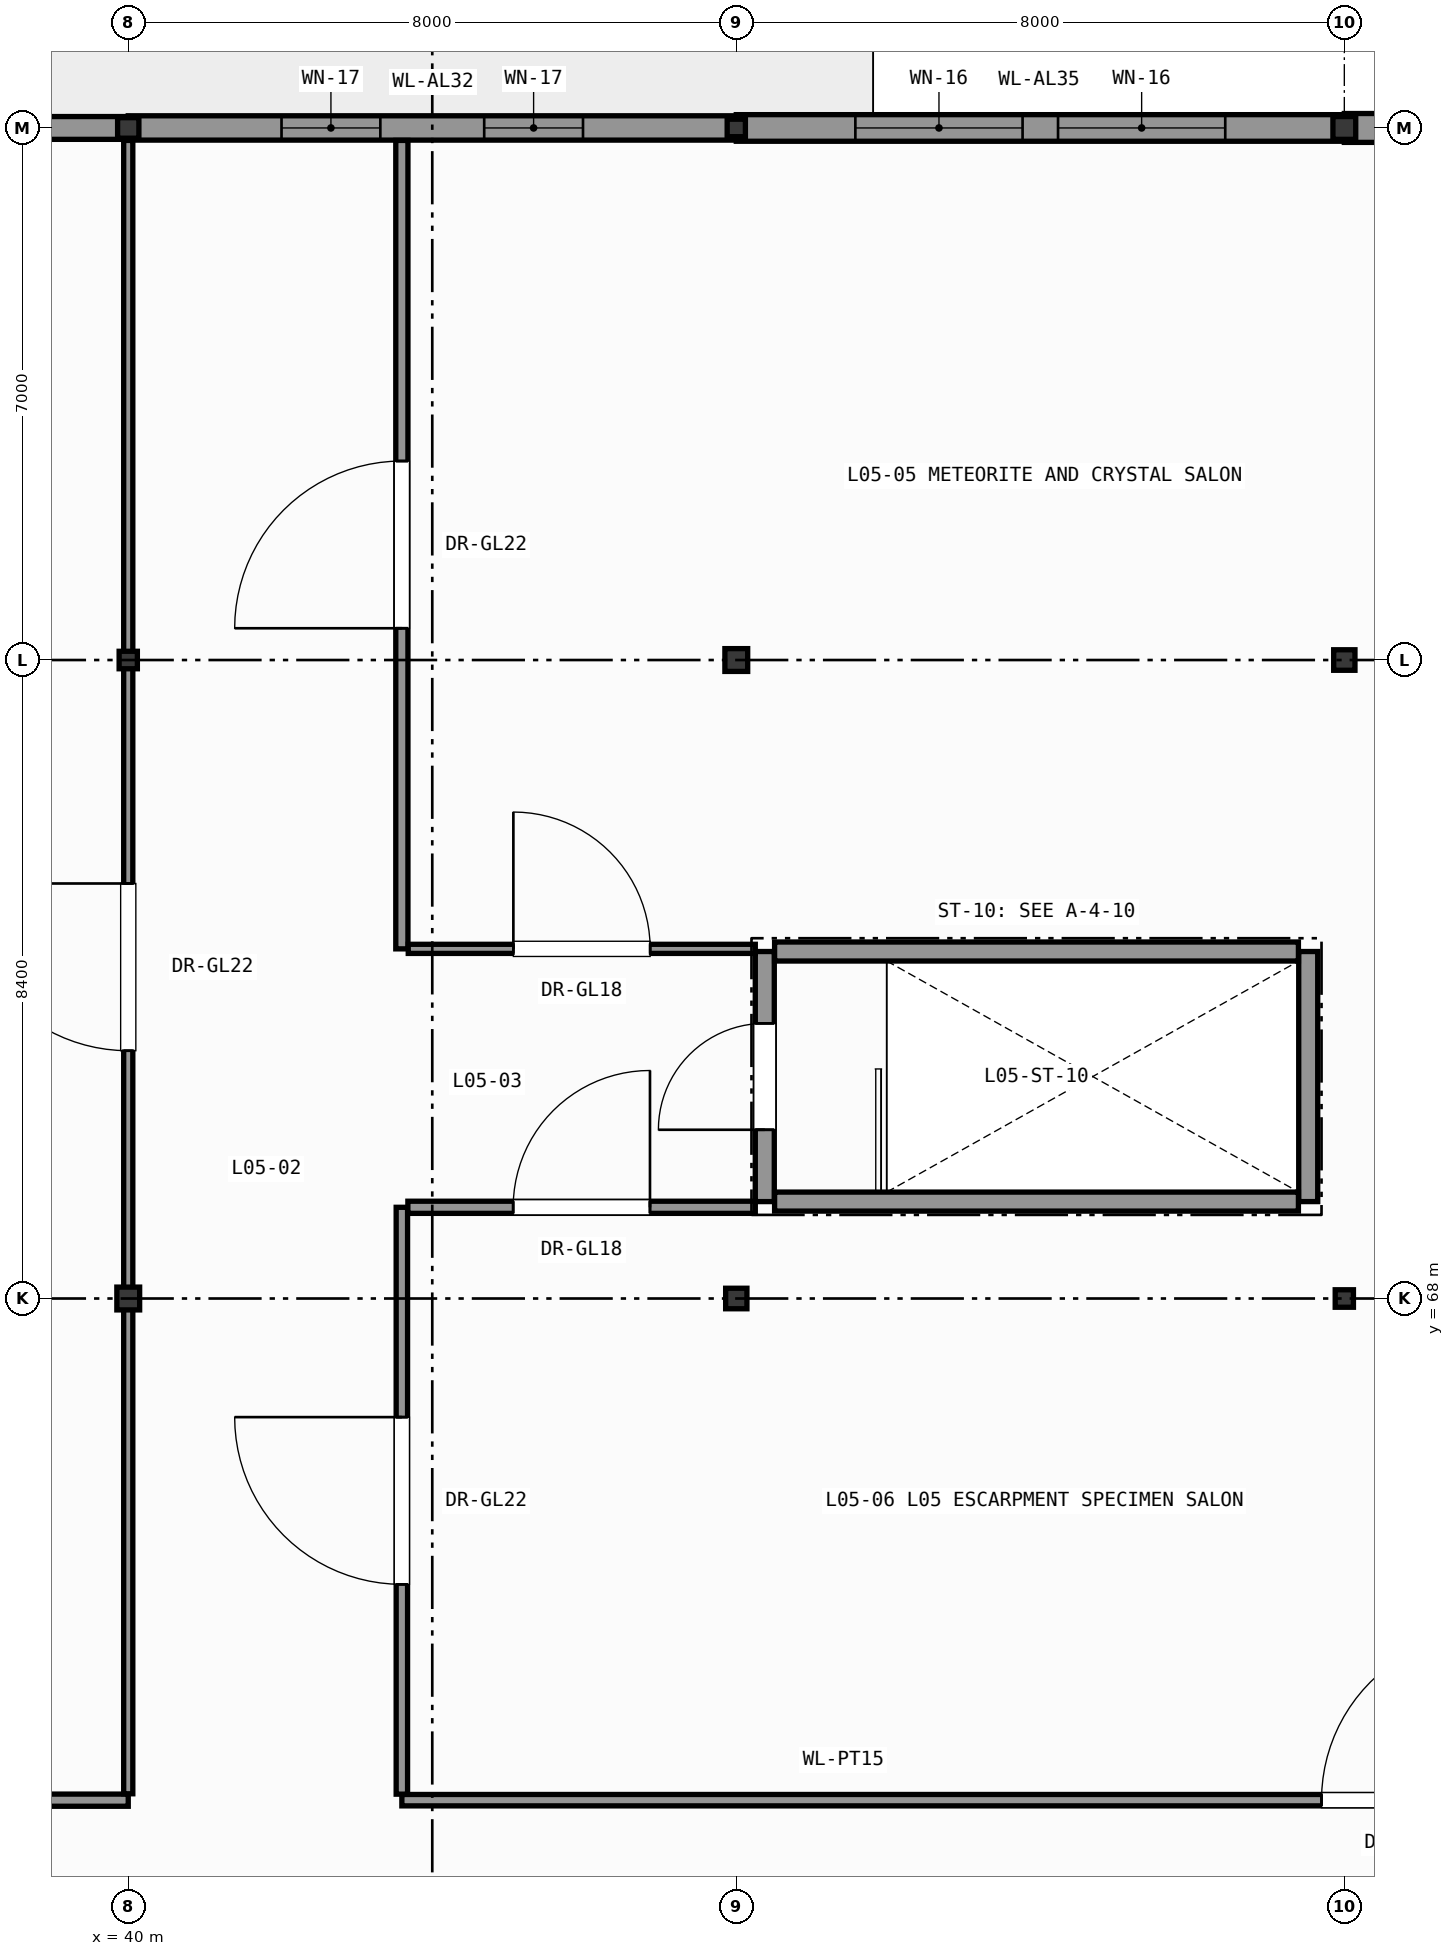
"""IFC4 building model, lengths in metres.
Left out: names, types, materials, properties, quantities, classifications, styles, units other than length and angle.
Written with IfcOpenShell. Run it as: python <this file> out.ifc"""

import sys

from ifc_helpers import new_model, si_unit, direction, frame, frame_2d, origin, origin_2d, place, context, subcontext, project, spatial, rectangle, i_section, extrude, element, fill, save


model = new_model("IFC4")
c1 = context("Model", 3, precision=1e-05, world=origin(), true_north=direction((0.0, 1.0)))
c2 = subcontext(c1, "Body", "Model", "MODEL_VIEW")
j1 = project(units=[si_unit("LENGTHUNIT", "METRE"), si_unit("PLANEANGLEUNIT", "RADIAN")], contexts=[c1])
p1 = place(None, origin())
s1 = spatial("IfcSite", under=j1, at=p1, CompositionType="ELEMENT")
p2 = place(p1, origin())
s2 = spatial("IfcBuilding", under=s1, at=p2, CompositionType="ELEMENT")
p3 = place(p2, frame((0.0, 0.0, 22.2)))
s3 = spatial("IfcBuildingStorey", under=s2, at=p3, CompositionType="ELEMENT", Elevation=22.2)
p4 = place(p3, frame((40.0, 68.0, 0.0), z_axis=(0.0, 0.0, 1.0), x_axis=(1.0, 0.0, 0.0)))
e1 = element("IfcColumn", 1, at=p4, inside=s3, PredefinedType="COLUMN", context=c2, shape_type="SweptSolid", body=[
    extrude(i_section(OverallWidth=0.3, OverallDepth=0.3, WebThickness=0.011, FlangeThickness=0.019, FilletRadius=0.027, at=origin_2d()), origin(), (0.0, 0.0, 1.0), 4.2),
])
p5 = place(p3, frame((40.0, 76.4, 0.0), z_axis=(0.0, 0.0, 1.0), x_axis=(1.0, 0.0, 0.0)))
e2 = element("IfcColumn", 2, at=p5, inside=s3, PredefinedType="COLUMN", context=c2, shape_type="SweptSolid", body=[
    extrude(i_section(OverallWidth=0.24, OverallDepth=0.23, WebThickness=0.008, FlangeThickness=0.012, FilletRadius=0.021, at=origin_2d()), origin(), (0.0, 0.0, 1.0), 4.2),
])
for number, where, z_axis, x_axis in (
    (3, (40.0, 83.4, 0.0), (0.0, 0.0, 1.0), (1.0, 0.0, 0.0)),
    (4, (48.0, 68.0, 0.0), (0.0, 0.0, 1.0), (1.0, 0.0, 0.0)),
):
    element("IfcColumn", number, at=place(p3, frame(where, z_axis=z_axis, x_axis=x_axis)), inside=s3, PredefinedType="COLUMN", context=c2, shape_type="SweptSolid", body=[
        extrude(i_section(OverallWidth=0.28, OverallDepth=0.27, WebThickness=0.008, FlangeThickness=0.013, FilletRadius=0.024, at=origin_2d()), origin(), (0.0, 0.0, 1.0), 4.2),
    ])
p6 = place(p3, frame((48.0, 76.4, 0.0), z_axis=(0.0, 0.0, 1.0), x_axis=(1.0, 0.0, 0.0)))
e5 = element("IfcColumn", 5, at=p6, inside=s3, PredefinedType="COLUMN", context=c2, shape_type="SweptSolid", body=[
    extrude(i_section(OverallWidth=0.3, OverallDepth=0.3, WebThickness=0.011, FlangeThickness=0.019, FilletRadius=0.027, at=origin_2d()), origin(), (0.0, 0.0, 1.0), 4.2),
])
for number, where, z_axis, x_axis in (
    (6, (48.0, 83.4, 0.0), (0.0, 0.0, 1.0), (1.0, 0.0, 0.0)),
    (7, (56.0, 68.0, 0.0), (0.0, 0.0, 1.0), (1.0, 0.0, 0.0)),
):
    element("IfcColumn", number, at=place(p3, frame(where, z_axis=z_axis, x_axis=x_axis)), inside=s3, PredefinedType="COLUMN", context=c2, shape_type="SweptSolid", body=[
        extrude(i_section(OverallWidth=0.24, OverallDepth=0.23, WebThickness=0.008, FlangeThickness=0.012, FilletRadius=0.021, at=origin_2d()), origin(), (0.0, 0.0, 1.0), 4.2),
    ])
p7 = place(p3, frame((56.0, 76.4, 0.0), z_axis=(0.0, 0.0, 1.0), x_axis=(1.0, 0.0, 0.0)))
e8 = element("IfcColumn", 8, at=p7, inside=s3, PredefinedType="COLUMN", context=c2, shape_type="SweptSolid", body=[
    extrude(i_section(OverallWidth=0.28, OverallDepth=0.27, WebThickness=0.008, FlangeThickness=0.013, FilletRadius=0.024, at=origin_2d()), origin(), (0.0, 0.0, 1.0), 4.2),
])
p8 = place(p3, frame((56.0, 83.4, 0.0), z_axis=(0.0, 0.0, 1.0), x_axis=(1.0, 0.0, 0.0)))
e9 = element("IfcColumn", 9, at=p8, inside=s3, PredefinedType="COLUMN", context=c2, shape_type="SweptSolid", body=[
    extrude(i_section(OverallWidth=0.3, OverallDepth=0.3, WebThickness=0.011, FlangeThickness=0.019, FilletRadius=0.027, at=origin_2d()), origin(), (0.0, 0.0, 1.0), 4.2),
])
p9 = place(p3, frame((56.0, 83.4, 0.0), z_axis=(0.0, 0.0, 1.0), x_axis=(1.0, 0.0, 0.0)))
e10 = element("IfcWall", 10, at=p9, inside=s3, PredefinedType="SOLIDWALL", context=c2, shape_type="SweptSolid", body=[
    extrude(rectangle(XDim=13.821, YDim=0.38, at=frame_2d((6.911, 0.0))), origin(), (0.0, 0.0, 1.0), 3.98),
])
p10 = place(p9, frame((3.807, 0.0, 0.95)))
e11 = element("IfcOpeningElement", 11, at=p10, cuts=e10, PredefinedType="OPENING", context=c2, shape_type="SweptSolid", body=[
    extrude(rectangle(XDim=1.6, YDim=2.6, at=frame_2d((0.8, 1.3))), frame((0.0, 0.2, 0.0), z_axis=(0.0, -1.0, 0.0), x_axis=(1.0, 0.0, 0.0)), (0.0, 0.0, 1.0), 0.4),
])
p11 = place(p9, frame((8.414, 0.0, 0.95)))
e12 = element("IfcOpeningElement", 12, at=p11, cuts=e10, PredefinedType="OPENING", context=c2, shape_type="SweptSolid", body=[
    extrude(rectangle(XDim=1.6, YDim=2.6, at=frame_2d((0.8, 1.3))), frame((0.0, 0.2, 0.0), z_axis=(0.0, -1.0, 0.0), x_axis=(1.0, 0.0, 0.0)), (0.0, 0.0, 1.0), 0.4),
])
p12 = place(p3, frame((48.0, 83.4, 0.0), z_axis=(0.0, 0.0, 1.0), x_axis=(1.0, 0.0, 0.0)))
e13 = element("IfcWall", 13, at=p12, inside=s3, PredefinedType="SOLIDWALL", context=c2, shape_type="SweptSolid", body=[
    extrude(rectangle(XDim=8.0, YDim=0.35, at=frame_2d((4.0, 0.0))), origin(), (0.0, 0.0, 1.0), 3.665),
])
p13 = place(p12, frame((1.567, 0.0, 0.95)))
e14 = element("IfcOpeningElement", 14, at=p13, cuts=e13, PredefinedType="OPENING", context=c2, shape_type="SweptSolid", body=[
    extrude(rectangle(XDim=2.2, YDim=2.31, at=frame_2d((1.1, 1.155))), frame((0.0, 0.185, 0.0), z_axis=(0.0, -1.0, 0.0), x_axis=(1.0, 0.0, 0.0)), (0.0, 0.0, 1.0), 0.37),
])
p14 = place(p12, frame((4.233, 0.0, 0.95)))
e15 = element("IfcOpeningElement", 15, at=p14, cuts=e13, PredefinedType="OPENING", context=c2, shape_type="SweptSolid", body=[
    extrude(rectangle(XDim=2.2, YDim=2.31, at=frame_2d((1.1, 1.155))), frame((0.0, 0.185, 0.0), z_axis=(0.0, -1.0, 0.0), x_axis=(1.0, 0.0, 0.0)), (0.0, 0.0, 1.0), 0.37),
])
p15 = place(p3, frame((40.0, 83.4, 0.0), z_axis=(0.0, 0.0, 1.0), x_axis=(1.0, 0.0, 0.0)))
e16 = element("IfcWall", 16, at=p15, inside=s3, PredefinedType="SOLIDWALL", context=c2, shape_type="SweptSolid", body=[
    extrude(rectangle(XDim=8.0, YDim=0.32, at=frame_2d((4.0, 0.0))), origin(), (0.0, 0.0, 1.0), 3.705),
])
p16 = place(p15, frame((2.017, 0.0, 0.95)))
e17 = element("IfcOpeningElement", 17, at=p16, cuts=e16, PredefinedType="OPENING", context=c2, shape_type="SweptSolid", body=[
    extrude(rectangle(XDim=1.3, YDim=2.3, at=frame_2d((0.65, 1.15))), frame((0.0, 0.17, 0.0), z_axis=(0.0, -1.0, 0.0), x_axis=(1.0, 0.0, 0.0)), (0.0, 0.0, 1.0), 0.34),
])
p17 = place(p15, frame((4.683, 0.0, 0.95)))
e18 = element("IfcOpeningElement", 18, at=p17, cuts=e16, PredefinedType="OPENING", context=c2, shape_type="SweptSolid", body=[
    extrude(rectangle(XDim=1.3, YDim=2.3, at=frame_2d((0.65, 1.15))), frame((0.0, 0.17, 0.0), z_axis=(0.0, -1.0, 0.0), x_axis=(1.0, 0.0, 0.0)), (0.0, 0.0, 1.0), 0.34),
])
p18 = place(p3, frame((32.0, 83.4, 0.0), z_axis=(0.0, 0.0, 1.0), x_axis=(1.0, 0.0, 0.0)))
e19 = element("IfcWall", 19, at=p18, inside=s3, PredefinedType="SOLIDWALL", context=c2, shape_type="SweptSolid", body=[
    extrude(rectangle(XDim=8.0, YDim=0.3, at=frame_2d((4.0, 0.0))), origin(), (0.0, 0.0, 1.0), 3.485),
])
p19 = place(p18, frame((1.817, 0.0, 0.95)))
e20 = element("IfcOpeningElement", 20, at=p19, cuts=e19, PredefinedType="OPENING", context=c2, shape_type="SweptSolid", body=[
    extrude(rectangle(XDim=1.7, YDim=2.13, at=frame_2d((0.85, 1.065))), frame((0.0, 0.16, 0.0), z_axis=(0.0, -1.0, 0.0), x_axis=(1.0, 0.0, 0.0)), (0.0, 0.0, 1.0), 0.32),
])
p20 = place(p18, frame((4.483, 0.0, 0.95)))
e21 = element("IfcOpeningElement", 21, at=p20, cuts=e19, PredefinedType="OPENING", context=c2, shape_type="SweptSolid", body=[
    extrude(rectangle(XDim=1.7, YDim=2.13, at=frame_2d((0.85, 1.065))), frame((0.0, 0.16, 0.0), z_axis=(0.0, -1.0, 0.0), x_axis=(1.0, 0.0, 0.0)), (0.0, 0.0, 1.0), 0.32),
])
p21 = place(p3, frame((48.375, 69.275, 0.0), z_axis=(0.0, 0.0, 1.0), x_axis=(0.0, 1.0, 0.0)))
e22 = element("IfcWall", 22, at=p21, inside=s3, PredefinedType="SHEAR", context=c2, shape_type="SweptSolid", body=[
    extrude(rectangle(XDim=3.29, YDim=0.25, at=frame_2d((1.645, 0.0))), origin(), (0.0, 0.0, 1.0), 3.98),
])
p22 = place(p21, frame((0.945, 0.0, 0.0)))
e23 = element("IfcOpeningElement", 23, at=p22, cuts=e22, PredefinedType="OPENING", context=c2, shape_type="SweptSolid", body=[
    extrude(rectangle(XDim=1.4, YDim=2.2, at=frame_2d((0.7, 1.1))), frame((0.0, 0.135, 0.0), z_axis=(0.0, -1.0, 0.0), x_axis=(1.0, 0.0, 0.0)), (0.0, 0.0, 1.0), 0.27),
])
p23 = place(p3, frame((55.525, 69.275, 0.0), z_axis=(0.0, 0.0, 1.0), x_axis=(0.0, 1.0, 0.0)))
e24 = element("IfcWall", 24, at=p23, inside=s3, PredefinedType="SHEAR", context=c2, shape_type="SweptSolid", body=[
    extrude(rectangle(XDim=3.29, YDim=0.25, at=frame_2d((1.645, 0.0))), origin(), (0.0, 0.0, 1.0), 3.98),
])
for number, where, z_axis, x_axis in (
    (25, (48.504, 69.275, 0.0), (0.0, 0.0, 1.0), (1.0, 0.0, 0.0)),
    (26, (48.504, 72.565, 0.0), (0.0, 0.0, 1.0), (1.0, 0.0, 0.0)),
):
    element("IfcWall", number, at=place(p3, frame(where, z_axis=z_axis, x_axis=x_axis)), inside=s3, PredefinedType="SHEAR", context=c2, shape_type="SweptSolid", body=[
        extrude(rectangle(XDim=6.892, YDim=0.25, at=frame_2d((3.446, 0.0))), origin(), (0.0, 0.0, 1.0), 3.98),
    ])
p24 = place(p3, frame((19.394, 61.4, 0.0), z_axis=(0.0, 0.0, 1.0), x_axis=(1.0, 0.0, 0.0)))
e27 = element("IfcWall", 27, at=p24, inside=s3, PredefinedType="PARTITIONING", context=c2, shape_type="SweptSolid", body=[
    extrude(rectangle(XDim=20.606, YDim=0.16, at=frame_2d((10.303, 0.0))), origin(), (0.0, 0.0, 1.0), 3.98),
])
p25 = place(p24, frame((9.203, 0.0, 0.0)))
e28 = element("IfcOpeningElement", 28, at=p25, cuts=e27, PredefinedType="OPENING", context=c2, shape_type="SweptSolid", body=[
    extrude(rectangle(XDim=2.2, YDim=2.6, at=frame_2d((1.1, 1.3))), frame((0.0, 0.09, 0.0), z_axis=(0.0, -1.0, 0.0), x_axis=(1.0, 0.0, 0.0)), (0.0, 0.0, 1.0), 0.18),
])
p26 = place(p3, frame((43.6, 61.4, 0.0), z_axis=(0.0, 0.0, 1.0), x_axis=(1.0, 0.0, 0.0)))
e29 = element("IfcWall", 29, at=p26, inside=s3, PredefinedType="PARTITIONING", context=c2, shape_type="SweptSolid", body=[
    extrude(rectangle(XDim=26.4, YDim=0.15, at=frame_2d((13.2, 0.0))), origin(), (0.0, 0.0, 1.0), 3.98),
])
p27 = place(p26, frame((12.1, 0.0, 0.0)))
e30 = element("IfcOpeningElement", 30, at=p27, cuts=e29, PredefinedType="OPENING", context=c2, shape_type="SweptSolid", body=[
    extrude(rectangle(XDim=2.2, YDim=2.6, at=frame_2d((1.1, 1.3))), frame((0.0, 0.085, 0.0), z_axis=(0.0, -1.0, 0.0), x_axis=(1.0, 0.0, 0.0)), (0.0, 0.0, 1.0), 0.17),
])
p28 = place(p3, frame((40.0, 61.484, 0.0), z_axis=(0.0, 0.0, 1.0), x_axis=(0.0, 1.0, 0.0)))
e31 = element("IfcWall", 31, at=p28, inside=s3, PredefinedType="PARTITIONING", context=c2, shape_type="SweptSolid", body=[
    extrude(rectangle(XDim=21.752, YDim=0.12, at=frame_2d((10.876, 0.0))), origin(), (0.0, 0.0, 1.0), 3.485),
])
p29 = place(p28, frame((9.776, 0.0, 0.0)))
e32 = element("IfcOpeningElement", 32, at=p29, cuts=e31, PredefinedType="OPENING", context=c2, shape_type="SweptSolid", body=[
    extrude(rectangle(XDim=2.2, YDim=2.6, at=frame_2d((1.1, 1.3))), frame((0.0, 0.07, 0.0), z_axis=(0.0, -1.0, 0.0), x_axis=(1.0, 0.0, 0.0)), (0.0, 0.0, 1.0), 0.14),
])
p30 = place(p3, frame((43.6, 72.6, 0.0), z_axis=(0.0, 0.0, 1.0), x_axis=(0.0, 1.0, 0.0)))
e33 = element("IfcWall", 33, at=p30, inside=s3, PredefinedType="PARTITIONING", context=c2, shape_type="SweptSolid", body=[
    extrude(rectangle(XDim=10.636, YDim=0.16, at=frame_2d((5.318, 0.0))), origin(), (0.0, 0.0, 1.0), 3.98),
])
p31 = place(p30, frame((4.218, 0.0, 0.0)))
e34 = element("IfcOpeningElement", 34, at=p31, cuts=e33, PredefinedType="OPENING", context=c2, shape_type="SweptSolid", body=[
    extrude(rectangle(XDim=2.2, YDim=2.6, at=frame_2d((1.1, 1.3))), frame((0.0, 0.09, 0.0), z_axis=(0.0, -1.0, 0.0), x_axis=(1.0, 0.0, 0.0)), (0.0, 0.0, 1.0), 0.18),
])
p32 = place(p3, frame((43.6, 61.479, 0.0), z_axis=(0.0, 0.0, 1.0), x_axis=(0.0, 1.0, 0.0)))
e35 = element("IfcWall", 35, at=p32, inside=s3, PredefinedType="PARTITIONING", context=c2, shape_type="SweptSolid", body=[
    extrude(rectangle(XDim=7.721, YDim=0.15, at=frame_2d((3.86, 0.0))), origin(), (0.0, 0.0, 1.0), 3.98),
])
p33 = place(p32, frame((2.76, 0.0, 0.0)))
e36 = element("IfcOpeningElement", 36, at=p33, cuts=e35, PredefinedType="OPENING", context=c2, shape_type="SweptSolid", body=[
    extrude(rectangle(XDim=2.2, YDim=2.6, at=frame_2d((1.1, 1.3))), frame((0.0, 0.085, 0.0), z_axis=(0.0, -1.0, 0.0), x_axis=(1.0, 0.0, 0.0)), (0.0, 0.0, 1.0), 0.17),
])
p34 = place(p3, frame((43.684, 72.6, 0.0), z_axis=(0.0, 0.0, 1.0), x_axis=(1.0, 0.0, 0.0)))
e37 = element("IfcWall", 37, at=p34, inside=s3, PredefinedType="PARTITIONING", context=c2, shape_type="SweptSolid", body=[
    extrude(rectangle(XDim=4.566, YDim=0.12, at=frame_2d((2.283, 0.0))), origin(), (0.0, 0.0, 1.0), 3.98),
])
p35 = place(p34, frame((1.383, 0.0, 0.0)))
e38 = element("IfcOpeningElement", 38, at=p35, cuts=e37, PredefinedType="OPENING", context=c2, shape_type="SweptSolid", body=[
    extrude(rectangle(XDim=1.8, YDim=2.4, at=frame_2d((0.9, 1.2))), frame((0.0, 0.07, 0.0), z_axis=(0.0, -1.0, 0.0), x_axis=(1.0, 0.0, 0.0)), (0.0, 0.0, 1.0), 0.14),
])
p36 = place(p3, frame((43.679, 69.2, 0.0), z_axis=(0.0, 0.0, 1.0), x_axis=(1.0, 0.0, 0.0)))
e39 = element("IfcWall", 39, at=p36, inside=s3, PredefinedType="PARTITIONING", context=c2, shape_type="SweptSolid", body=[
    extrude(rectangle(XDim=4.571, YDim=0.16, at=frame_2d((2.286, 0.0))), origin(), (0.0, 0.0, 1.0), 3.98),
])
p37 = place(p36, frame((1.385, 0.0, 0.0)))
e40 = element("IfcOpeningElement", 40, at=p37, cuts=e39, PredefinedType="OPENING", context=c2, shape_type="SweptSolid", body=[
    extrude(rectangle(XDim=1.8, YDim=2.4, at=frame_2d((0.9, 1.2))), frame((0.0, 0.09, 0.0), z_axis=(0.0, -1.0, 0.0), x_axis=(1.0, 0.0, 0.0)), (0.0, 0.0, 1.0), 0.18),
])
p38 = place(p13, origin())
e41 = element("IfcWindow", 41, at=p38, inside=s3, PartitioningType="SINGLE_PANEL", PredefinedType="WINDOW", context=c2, shape_type="SweptSolid", body=[
    extrude(rectangle(XDim=2.2, YDim=2.31, at=frame_2d((1.1, 1.155))), frame((0.0, 0.03, 0.0), z_axis=(0.0, -1.0, 0.0), x_axis=(1.0, 0.0, 0.0)), (0.0, 0.0, 1.0), 0.06),
])
fill(e14, e41)
p39 = place(p14, origin())
e42 = element("IfcWindow", 42, at=p39, inside=s3, PartitioningType="SINGLE_PANEL", PredefinedType="WINDOW", context=c2, shape_type="SweptSolid", body=[
    extrude(rectangle(XDim=2.2, YDim=2.31, at=frame_2d((1.1, 1.155))), frame((0.0, 0.03, 0.0), z_axis=(0.0, -1.0, 0.0), x_axis=(1.0, 0.0, 0.0)), (0.0, 0.0, 1.0), 0.06),
])
fill(e15, e42)
p40 = place(p16, origin())
e43 = element("IfcWindow", 43, at=p40, inside=s3, PartitioningType="SINGLE_PANEL", PredefinedType="WINDOW", context=c2, shape_type="SweptSolid", body=[
    extrude(rectangle(XDim=1.3, YDim=2.3, at=frame_2d((0.65, 1.15))), frame((0.0, 0.03, 0.0), z_axis=(0.0, -1.0, 0.0), x_axis=(1.0, 0.0, 0.0)), (0.0, 0.0, 1.0), 0.06),
])
fill(e17, e43)
p41 = place(p17, origin())
e44 = element("IfcWindow", 44, at=p41, inside=s3, PartitioningType="SINGLE_PANEL", PredefinedType="WINDOW", context=c2, shape_type="SweptSolid", body=[
    extrude(rectangle(XDim=1.3, YDim=2.3, at=frame_2d((0.65, 1.15))), frame((0.0, 0.03, 0.0), z_axis=(0.0, -1.0, 0.0), x_axis=(1.0, 0.0, 0.0)), (0.0, 0.0, 1.0), 0.06),
])
fill(e18, e44)
p42 = place(p22, origin())
e45 = element("IfcDoor", 45, at=p42, inside=s3, OperationType="SINGLE_SWING_LEFT", PredefinedType="DOOR", context=c2, shape_type="SweptSolid", body=[
    extrude(rectangle(XDim=1.4, YDim=2.2, at=frame_2d((0.7, 1.1))), frame((0.0, 0.025, 0.0), z_axis=(0.0, -1.0, 0.0), x_axis=(1.0, 0.0, 0.0)), (0.0, 0.0, 1.0), 0.05),
])
fill(e23, e45)
p43 = place(p27, origin())
e46 = element("IfcDoor", 46, at=p43, inside=s3, OperationType="SINGLE_SWING_RIGHT", PredefinedType="DOOR", context=c2, shape_type="SweptSolid", body=[
    extrude(rectangle(XDim=2.2, YDim=2.6, at=frame_2d((1.1, 1.3))), frame((0.0, 0.025, 0.0), z_axis=(0.0, -1.0, 0.0), x_axis=(1.0, 0.0, 0.0)), (0.0, 0.0, 1.0), 0.05),
])
fill(e30, e46)
p44 = place(p29, origin())
e47 = element("IfcDoor", 47, at=p44, inside=s3, OperationType="SINGLE_SWING_RIGHT", PredefinedType="DOOR", context=c2, shape_type="SweptSolid", body=[
    extrude(rectangle(XDim=2.2, YDim=2.6, at=frame_2d((1.1, 1.3))), frame((0.0, 0.025, 0.0), z_axis=(0.0, -1.0, 0.0), x_axis=(1.0, 0.0, 0.0)), (0.0, 0.0, 1.0), 0.05),
])
fill(e32, e47)
p45 = place(p31, origin())
e48 = element("IfcDoor", 48, at=p45, inside=s3, OperationType="SINGLE_SWING_LEFT", PredefinedType="DOOR", context=c2, shape_type="SweptSolid", body=[
    extrude(rectangle(XDim=2.2, YDim=2.6, at=frame_2d((1.1, 1.3))), frame((0.0, 0.025, 0.0), z_axis=(0.0, -1.0, 0.0), x_axis=(1.0, 0.0, 0.0)), (0.0, 0.0, 1.0), 0.05),
])
fill(e34, e48)
p46 = place(p33, origin())
e49 = element("IfcDoor", 49, at=p46, inside=s3, OperationType="SINGLE_SWING_RIGHT", PredefinedType="DOOR", context=c2, shape_type="SweptSolid", body=[
    extrude(rectangle(XDim=2.2, YDim=2.6, at=frame_2d((1.1, 1.3))), frame((0.0, 0.025, 0.0), z_axis=(0.0, -1.0, 0.0), x_axis=(1.0, 0.0, 0.0)), (0.0, 0.0, 1.0), 0.05),
])
fill(e36, e49)
p47 = place(p35, origin())
e50 = element("IfcDoor", 50, at=p47, inside=s3, OperationType="SINGLE_SWING_LEFT", PredefinedType="DOOR", context=c2, shape_type="SweptSolid", body=[
    extrude(rectangle(XDim=1.8, YDim=2.4, at=frame_2d((0.9, 1.2))), frame((0.0, 0.025, 0.0), z_axis=(0.0, -1.0, 0.0), x_axis=(1.0, 0.0, 0.0)), (0.0, 0.0, 1.0), 0.05),
])
fill(e38, e50)
p48 = place(p37, origin())
e51 = element("IfcDoor", 51, at=p48, inside=s3, OperationType="SINGLE_SWING_RIGHT", PredefinedType="DOOR", context=c2, shape_type="SweptSolid", body=[
    extrude(rectangle(XDim=1.8, YDim=2.4, at=frame_2d((0.9, 1.2))), frame((0.0, 0.025, 0.0), z_axis=(0.0, -1.0, 0.0), x_axis=(1.0, 0.0, 0.0)), (0.0, 0.0, 1.0), 0.05),
])
fill(e40, e51)
save(model, sys.argv[1])
